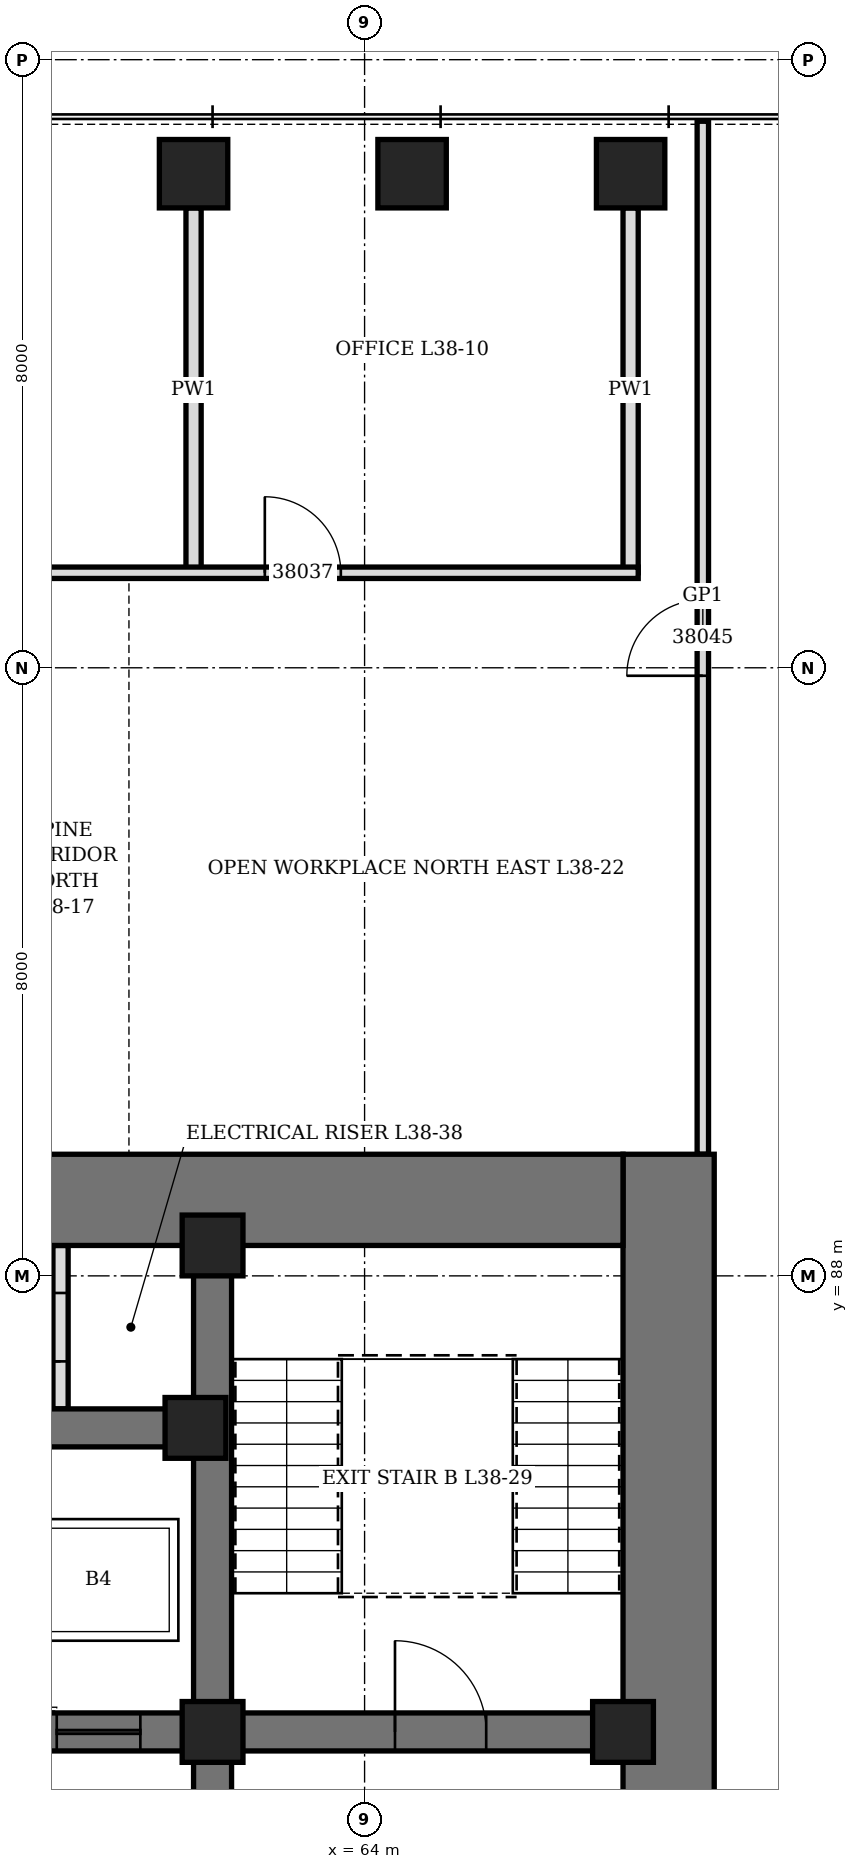
"""IFC4 building model, lengths in metres.
Left out: names, types, materials, properties, quantities, classifications, styles, units other than length and angle.
Written with IfcOpenShell. Run it as: python <this file> out.ifc"""

import sys

from ifc_helpers import new_model, si_unit, direction, frame, frame_2d, origin, origin_2d, place, context, subcontext, project, spatial, rectangle, hollow_rectangle, extrude, element, fill, save


model = new_model("IFC4")
c1 = context("Model", 3, precision=1e-05, world=origin(), true_north=direction((0.0, 1.0)))
c2 = subcontext(c1, "Body", "Model", "MODEL_VIEW")
j1 = project(units=[si_unit("LENGTHUNIT", "METRE"), si_unit("PLANEANGLEUNIT", "RADIAN")], contexts=[c1])
p1 = place(None, origin())
s1 = spatial("IfcSite", under=j1, at=p1, CompositionType="ELEMENT")
p2 = place(p1, origin())
s2 = spatial("IfcBuilding", under=s1, at=p2, CompositionType="ELEMENT")
p3 = place(p2, frame((0.0, 0.0, 171.1)))
s3 = spatial("IfcBuildingStorey", under=s2, at=p3, CompositionType="ELEMENT", Elevation=171.1)
for number, where, z_axis, x_axis in (
    (1, (67.5, 102.5, 0.0), (0.0, 0.0, 1.0), (1.0, 0.0, 0.0)),
    (2, (64.625, 102.5, 0.0), (0.0, 0.0, 1.0), (1.0, 0.0, 0.0)),
    (3, (61.75, 102.5, 0.0), (0.0, 0.0, 1.0), (1.0, 0.0, 0.0)),
):
    element("IfcColumn", number, at=place(p3, frame(where, z_axis=z_axis, x_axis=x_axis)), inside=s3, PredefinedType="COLUMN", context=c2, shape_type="SweptSolid", body=[
        extrude(hollow_rectangle(XDim=0.9, YDim=0.9, WallThickness=0.12, at=origin_2d()), origin(), (0.0, 0.0, 1.0), 4.2),
    ])
p4 = place(p3, frame((68.0, 70.4, 0.0), z_axis=(0.0, 0.0, 1.0), x_axis=(0.0, 1.0, 0.0)))
e4 = element("IfcWall", 4, at=p4, inside=s3, PredefinedType="SHEAR", context=c2, shape_type="SweptSolid", body=[
    extrude(rectangle(XDim=19.2, YDim=1.2, at=frame_2d((9.6, 0.0))), origin(), (0.0, 0.0, 1.0), 4.2),
])
p5 = place(p4, frame((8.6, 0.0, 0.0)))
e5 = element("IfcOpeningElement", 5, at=p5, cuts=e4, PredefinedType="OPENING", context=c2, shape_type="SweptSolid", body=[
    extrude(rectangle(XDim=2.0, YDim=2.4, at=frame_2d((1.0, 1.2))), frame((0.0, 0.61, 0.0), z_axis=(0.0, -1.0, 0.0), x_axis=(1.0, 0.0, 0.0)), (0.0, 0.0, 1.0), 1.22),
])
p6 = place(p3, frame((44.6, 89.0, 0.0), z_axis=(0.0, 0.0, 1.0), x_axis=(1.0, 0.0, 0.0)))
e6 = element("IfcWall", 6, at=p6, inside=s3, PredefinedType="SHEAR", context=c2, shape_type="SweptSolid", body=[
    extrude(rectangle(XDim=22.8, YDim=1.2, at=frame_2d((11.4, 0.0))), origin(), (0.0, 0.0, 1.0), 4.2),
])
p7 = place(p6, frame((7.9, 0.0, 0.0)))
e7 = element("IfcOpeningElement", 7, at=p7, cuts=e6, PredefinedType="OPENING", context=c2, shape_type="SweptSolid", body=[
    extrude(rectangle(XDim=1.0, YDim=2.1, at=frame_2d((0.5, 1.05))), frame((0.0, 0.61, 0.0), z_axis=(0.0, -1.0, 0.0), x_axis=(1.0, 0.0, 0.0)), (0.0, 0.0, 1.0), 1.22),
])
p8 = place(p6, frame((12.05, 0.0, 0.0)))
e8 = element("IfcOpeningElement", 8, at=p8, cuts=e6, PredefinedType="OPENING", context=c2, shape_type="SweptSolid", body=[
    extrude(rectangle(XDim=0.9, YDim=2.1, at=frame_2d((0.45, 1.05))), frame((0.0, 0.61, 0.0), z_axis=(0.0, -1.0, 0.0), x_axis=(1.0, 0.0, 0.0)), (0.0, 0.0, 1.0), 1.22),
])
p9 = place(p6, frame((13.975, 0.0, 0.0)))
e9 = element("IfcOpeningElement", 9, at=p9, cuts=e6, PredefinedType="OPENING", context=c2, shape_type="SweptSolid", body=[
    extrude(rectangle(XDim=0.9, YDim=2.1, at=frame_2d((0.45, 1.05))), frame((0.0, 0.61, 0.0), z_axis=(0.0, -1.0, 0.0), x_axis=(1.0, 0.0, 0.0)), (0.0, 0.0, 1.0), 1.22),
])
p10 = place(p3, frame((62.0, 71.6, 0.0), z_axis=(0.0, 0.0, 1.0), x_axis=(0.0, 1.0, 0.0)))
e10 = element("IfcWall", 10, at=p10, inside=s3, PredefinedType="SHEAR", context=c2, shape_type="SweptSolid", body=[
    extrude(rectangle(XDim=16.8, YDim=0.5, at=frame_2d((8.4, 0.0))), origin(), (0.0, 0.0, 1.0), 4.2),
])
p11 = place(p10, frame((7.5, 0.0, 0.0)))
e11 = element("IfcOpeningElement", 11, at=p11, cuts=e10, PredefinedType="OPENING", context=c2, shape_type="SweptSolid", body=[
    extrude(rectangle(XDim=1.8, YDim=2.4, at=frame_2d((0.9, 1.2))), frame((0.0, 0.26, 0.0), z_axis=(0.0, -1.0, 0.0), x_axis=(1.0, 0.0, 0.0)), (0.0, 0.0, 1.0), 0.52),
])
p12 = place(p3, frame((62.25, 82.0, 0.0), z_axis=(0.0, 0.0, 1.0), x_axis=(1.0, 0.0, 0.0)))
e12 = element("IfcWall", 12, at=p12, inside=s3, PredefinedType="SHEAR", context=c2, shape_type="SweptSolid", body=[
    extrude(rectangle(XDim=5.15, YDim=0.5, at=frame_2d((2.575, 0.0))), origin(), (0.0, 0.0, 1.0), 4.2),
])
p13 = place(p12, frame((2.15, 0.0, 0.0)))
e13 = element("IfcOpeningElement", 13, at=p13, cuts=e12, PredefinedType="OPENING", context=c2, shape_type="SweptSolid", body=[
    extrude(rectangle(XDim=1.2, YDim=2.1, at=frame_2d((0.6, 1.05))), frame((0.0, 0.26, 0.0), z_axis=(0.0, -1.0, 0.0), x_axis=(1.0, 0.0, 0.0)), (0.0, 0.0, 1.0), 0.52),
])
p14 = place(p3, frame((50.25, 82.0, 0.0), z_axis=(0.0, 0.0, 1.0), x_axis=(1.0, 0.0, 0.0)))
e14 = element("IfcWall", 14, at=p14, inside=s3, PredefinedType="SHEAR", context=c2, shape_type="SweptSolid", body=[
    extrude(rectangle(XDim=11.5, YDim=0.5, at=frame_2d((5.75, 0.0))), origin(), (0.0, 0.0, 1.0), 4.2),
])
p15 = place(p14, frame((0.7, 0.0, 0.0)))
e15 = element("IfcOpeningElement", 15, at=p15, cuts=e14, PredefinedType="OPENING", context=c2, shape_type="SweptSolid", body=[
    extrude(rectangle(XDim=1.1, YDim=2.2, at=frame_2d((0.55, 1.1))), frame((0.0, 0.26, 0.0), z_axis=(0.0, -1.0, 0.0), x_axis=(1.0, 0.0, 0.0)), (0.0, 0.0, 1.0), 0.52),
])
p16 = place(p14, frame((3.7, 0.0, 0.0)))
e16 = element("IfcOpeningElement", 16, at=p16, cuts=e14, PredefinedType="OPENING", context=c2, shape_type="SweptSolid", body=[
    extrude(rectangle(XDim=1.1, YDim=2.2, at=frame_2d((0.55, 1.1))), frame((0.0, 0.26, 0.0), z_axis=(0.0, -1.0, 0.0), x_axis=(1.0, 0.0, 0.0)), (0.0, 0.0, 1.0), 0.52),
])
p17 = place(p14, frame((6.7, 0.0, 0.0)))
e17 = element("IfcOpeningElement", 17, at=p17, cuts=e14, PredefinedType="OPENING", context=c2, shape_type="SweptSolid", body=[
    extrude(rectangle(XDim=1.1, YDim=2.2, at=frame_2d((0.55, 1.1))), frame((0.0, 0.26, 0.0), z_axis=(0.0, -1.0, 0.0), x_axis=(1.0, 0.0, 0.0)), (0.0, 0.0, 1.0), 0.52),
])
p18 = place(p14, frame((9.7, 0.0, 0.0)))
e18 = element("IfcOpeningElement", 18, at=p18, cuts=e14, PredefinedType="OPENING", context=c2, shape_type="SweptSolid", body=[
    extrude(rectangle(XDim=1.1, YDim=2.2, at=frame_2d((0.55, 1.1))), frame((0.0, 0.26, 0.0), z_axis=(0.0, -1.0, 0.0), x_axis=(1.0, 0.0, 0.0)), (0.0, 0.0, 1.0), 0.52),
])
p19 = place(p3, frame((50.25, 86.0, 0.0), z_axis=(0.0, 0.0, 1.0), x_axis=(1.0, 0.0, 0.0)))
e19 = element("IfcWall", 19, at=p19, inside=s3, PredefinedType="SHEAR", context=c2, shape_type="SweptSolid", body=[
    extrude(rectangle(XDim=11.5, YDim=0.5, at=frame_2d((5.75, 0.0))), origin(), (0.0, 0.0, 1.0), 4.2),
])
for number, where, z_axis, x_axis in (
    (20, (61.775, 86.0, 0.0), (0.0, 0.0, 1.0), (1.0, 0.0, 0.0)),
    (21, (62.0, 82.0, 0.0), (0.0, 0.0, 1.0), (1.0, 0.0, 0.0)),
    (22, (62.0, 88.4, 0.0), (0.0, 0.0, 1.0), (1.0, 0.0, 0.0)),
    (23, (67.4, 82.0, 0.0), (0.0, 0.0, 1.0), (1.0, 0.0, 0.0)),
):
    element("IfcColumn", number, at=place(p3, frame(where, z_axis=z_axis, x_axis=x_axis)), inside=s3, PredefinedType="COLUMN", context=c2, shape_type="SweptSolid", body=[
        extrude(hollow_rectangle(XDim=0.8, YDim=0.8, WallThickness=0.1, at=origin_2d()), origin(), (0.0, 0.0, 1.0), 4.2),
    ])
p20 = place(p3, frame((60.0, 86.25, 0.0), z_axis=(0.0, 0.0, 1.0), x_axis=(0.0, 1.0, 0.0)))
e24 = element("IfcWall", 24, at=p20, inside=s3, PredefinedType="PARTITIONING", context=c2, shape_type="SweptSolid", body=[
    extrude(rectangle(XDim=2.15, YDim=0.2, at=frame_2d((1.075, 0.0))), origin(), (0.0, 0.0, 1.0), 3.95),
])
p21 = place(p20, frame((0.625, 0.0, 0.0)))
e25 = element("IfcOpeningElement", 25, at=p21, cuts=e24, PredefinedType="OPENING", context=c2, shape_type="SweptSolid", body=[
    extrude(rectangle(XDim=0.9, YDim=2.1, at=frame_2d((0.45, 1.05))), frame((0.0, 0.11, 0.0), z_axis=(0.0, -1.0, 0.0), x_axis=(1.0, 0.0, 0.0)), (0.0, 0.0, 1.0), 0.22),
])
p22 = place(p3, frame((61.75, 97.25, 0.0), z_axis=(0.0, 0.0, 1.0), x_axis=(0.0, 1.0, 0.0)))
e26 = element("IfcWall", 26, at=p22, inside=s3, PredefinedType="PARTITIONING", context=c2, shape_type="SweptSolid", body=[
    extrude(rectangle(XDim=4.8, YDim=0.2, at=frame_2d((2.4, 0.0))), origin(), (0.0, 0.0, 1.0), 2.45),
])
p23 = place(p3, frame((67.5, 97.25, 0.0), z_axis=(0.0, 0.0, 1.0), x_axis=(0.0, 1.0, 0.0)))
e27 = element("IfcWall", 27, at=p23, inside=s3, PredefinedType="PARTITIONING", context=c2, shape_type="SweptSolid", body=[
    extrude(rectangle(XDim=4.8, YDim=0.2, at=frame_2d((2.4, 0.0))), origin(), (0.0, 0.0, 1.0), 2.65),
])
p24 = place(p3, frame((39.2, 97.25, 0.0), z_axis=(0.0, 0.0, 1.0), x_axis=(1.0, 0.0, 0.0)))
e28 = element("IfcWall", 28, at=p24, inside=s3, PredefinedType="PARTITIONING", context=c2, shape_type="SweptSolid", body=[
    extrude(rectangle(XDim=28.4, YDim=0.15, at=frame_2d((14.2, 0.0))), origin(), (0.0, 0.0, 1.0), 3.95),
])
p25 = place(p24, frame((3.05, 0.0, 0.0)))
e29 = element("IfcOpeningElement", 29, at=p25, cuts=e28, PredefinedType="OPENING", context=c2, shape_type="SweptSolid", body=[
    extrude(rectangle(XDim=1.0, YDim=2.4, at=frame_2d((0.5, 1.2))), frame((0.0, 0.085, 0.0), z_axis=(0.0, -1.0, 0.0), x_axis=(1.0, 0.0, 0.0)), (0.0, 0.0, 1.0), 0.17),
])
p26 = place(p24, frame((14.863, 0.0, 0.0)))
e30 = element("IfcOpeningElement", 30, at=p26, cuts=e28, PredefinedType="OPENING", context=c2, shape_type="SweptSolid", body=[
    extrude(rectangle(XDim=1.0, YDim=2.4, at=frame_2d((0.5, 1.2))), frame((0.0, 0.085, 0.0), z_axis=(0.0, -1.0, 0.0), x_axis=(1.0, 0.0, 0.0)), (0.0, 0.0, 1.0), 0.17),
])
p27 = place(p24, frame((23.488, 0.0, 0.0)))
e31 = element("IfcOpeningElement", 31, at=p27, cuts=e28, PredefinedType="OPENING", context=c2, shape_type="SweptSolid", body=[
    extrude(rectangle(XDim=1.0, YDim=2.1, at=frame_2d((0.5, 1.05))), frame((0.0, 0.085, 0.0), z_axis=(0.0, -1.0, 0.0), x_axis=(1.0, 0.0, 0.0)), (0.0, 0.0, 1.0), 0.17),
])
p28 = place(p3, frame((68.45, 89.6, 0.0), z_axis=(0.0, 0.0, 1.0), x_axis=(0.0, 1.0, 0.0)))
e32 = element("IfcWall", 32, at=p28, inside=s3, PredefinedType="PARTITIONING", context=c2, shape_type="SweptSolid", body=[
    extrude(rectangle(XDim=13.59, YDim=0.15, at=frame_2d((6.795, 0.0))), origin(), (0.0, 0.0, 1.0), 3.95),
])
p29 = place(p28, frame((6.295, 0.0, 0.0)))
e33 = element("IfcOpeningElement", 33, at=p29, cuts=e32, PredefinedType="OPENING", context=c2, shape_type="SweptSolid", body=[
    extrude(rectangle(XDim=1.0, YDim=2.4, at=frame_2d((0.5, 1.2))), frame((0.0, 0.085, 0.0), z_axis=(0.0, -1.0, 0.0), x_axis=(1.0, 0.0, 0.0)), (0.0, 0.0, 1.0), 0.17),
])
p30 = place(p21, origin())
e34 = element("IfcDoor", 34, at=p30, inside=s3, OperationType="SINGLE_SWING_LEFT", PredefinedType="DOOR", context=c2, shape_type="SweptSolid", body=[
    extrude(rectangle(XDim=0.9, YDim=2.1, at=frame_2d((0.45, 1.05))), frame((0.0, 0.1, 0.0), z_axis=(0.0, -1.0, 0.0), x_axis=(1.0, 0.0, 0.0)), (0.0, 0.0, 1.0), 0.199),
])
fill(e25, e34)
p31 = place(p13, origin())
e35 = element("IfcDoor", 35, at=p31, inside=s3, OperationType="SINGLE_SWING_LEFT", PredefinedType="DOOR", context=c2, shape_type="SweptSolid", body=[
    extrude(rectangle(XDim=1.2, YDim=2.1, at=frame_2d((0.6, 1.05))), frame((0.0, 0.25, 0.0), z_axis=(0.0, -1.0, 0.0), x_axis=(1.0, 0.0, 0.0)), (0.0, 0.0, 1.0), 0.5),
])
fill(e13, e35)
p32 = place(p18, origin())
e36 = element("IfcDoor", 36, at=p32, inside=s3, OperationType="SLIDING_TO_LEFT", PredefinedType="DOOR", context=c2, shape_type="SweptSolid", body=[
    extrude(rectangle(XDim=1.1, YDim=2.2, at=frame_2d((0.55, 1.1))), frame((0.0, 0.25, 0.0), z_axis=(0.0, -1.0, 0.0), x_axis=(1.0, 0.0, 0.0)), (0.0, 0.0, 1.0), 0.5),
])
fill(e18, e36)
p33 = place(p27, origin())
e37 = element("IfcDoor", 37, at=p33, inside=s3, OperationType="SINGLE_SWING_LEFT", PredefinedType="DOOR", context=c2, shape_type="SweptSolid", body=[
    extrude(rectangle(XDim=1.0, YDim=2.1, at=frame_2d((0.5, 1.05))), frame((0.0, 0.075, 0.0), z_axis=(0.0, -1.0, 0.0), x_axis=(1.0, 0.0, 0.0)), (0.0, 0.0, 1.0), 0.149),
])
fill(e31, e37)
p34 = place(p29, origin())
e38 = element("IfcDoor", 38, at=p34, inside=s3, OperationType="SINGLE_SWING_RIGHT", PredefinedType="DOOR", context=c2, shape_type="SweptSolid", body=[
    extrude(rectangle(XDim=1.0, YDim=2.4, at=frame_2d((0.5, 1.2))), frame((0.0, 0.075, 0.0), z_axis=(0.0, -1.0, 0.0), x_axis=(1.0, 0.0, 0.0)), (0.0, 0.0, 1.0), 0.149),
])
fill(e33, e38)
save(model, sys.argv[1])
